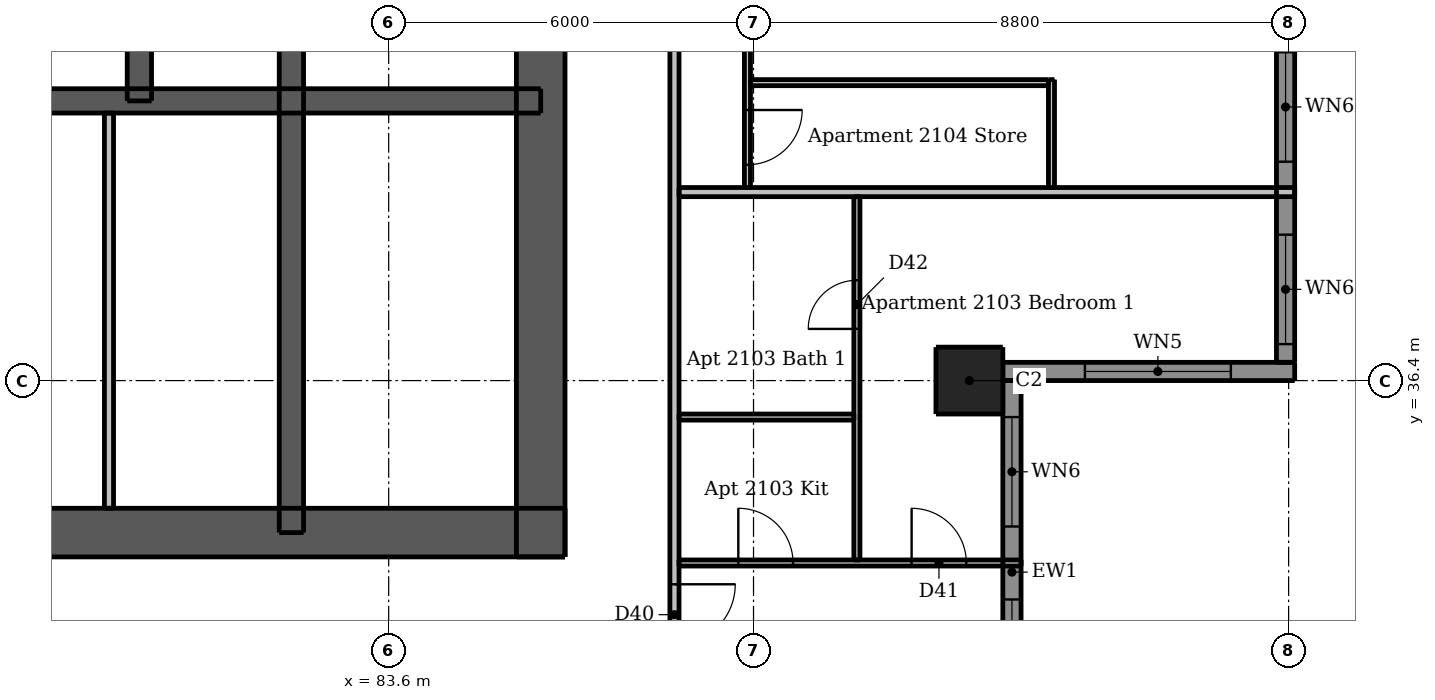
"""IFC4 building model, lengths in metres.
Left out: names, types, materials, properties, quantities, classifications, styles, units other than length and angle.
Written with IfcOpenShell. Run it as: python <this file> out.ifc"""

import sys

from ifc_helpers import new_model, si_unit, direction, frame, frame_2d, origin, origin_2d, place, context, subcontext, project, spatial, rectangle, extrude, element, fill, save


model = new_model("IFC4")
c1 = context("Model", 3, precision=1e-05, world=origin(), true_north=direction((0.0, 1.0)))
c2 = subcontext(c1, "Body", "Model", "MODEL_VIEW")
j1 = project(units=[si_unit("LENGTHUNIT", "METRE"), si_unit("PLANEANGLEUNIT", "RADIAN")], contexts=[c1])
p1 = place(None, origin())
s1 = spatial("IfcSite", under=j1, at=p1, CompositionType="ELEMENT")
p2 = place(p1, origin())
s2 = spatial("IfcBuilding", under=s1, at=p2, CompositionType="ELEMENT")
p3 = place(p2, frame((0.0, 0.0, 82.0)))
s3 = spatial("IfcBuildingStorey", under=s2, at=p3, CompositionType="ELEMENT", Elevation=82.0)
p4 = place(p3, frame((62.5, 33.9, 0.0), z_axis=(0.0, 0.0, 1.0), x_axis=(1.0, 0.0, 0.0)))
e1 = element("IfcWall", 1, at=p4, inside=s3, PredefinedType="SHEAR", context=c2, shape_type="SweptSolid", body=[
    extrude(rectangle(XDim=24.0, YDim=0.8, at=frame_2d((12.0, 0.0))), origin(), (0.0, 0.0, 1.0), 3.05),
])
p5 = place(p4, frame((2.0, 0.0, 0.0)))
e2 = element("IfcOpeningElement", 2, at=p5, cuts=e1, PredefinedType="OPENING", context=c2, shape_type="SweptSolid", body=[
    extrude(rectangle(XDim=1.1, YDim=2.1, at=frame_2d((0.55, 1.05))), frame((0.0, 0.41, 0.0), z_axis=(0.0, -1.0, 0.0), x_axis=(1.0, 0.0, 0.0)), (0.0, 0.0, 1.0), 0.82),
])
p6 = place(p4, frame((20.9, 0.0, 0.0)))
e3 = element("IfcOpeningElement", 3, at=p6, cuts=e1, PredefinedType="OPENING", context=c2, shape_type="SweptSolid", body=[
    extrude(rectangle(XDim=1.1, YDim=2.1, at=frame_2d((0.55, 1.05))), frame((0.0, 0.41, 0.0), z_axis=(0.0, -1.0, 0.0), x_axis=(1.0, 0.0, 0.0)), (0.0, 0.0, 1.0), 0.82),
])
p7 = place(p4, frame((8.0, 0.0, 0.0)))
e4 = element("IfcOpeningElement", 4, at=p7, cuts=e1, PredefinedType="OPENING", context=c2, shape_type="SweptSolid", body=[
    extrude(rectangle(XDim=1.1, YDim=2.1, at=frame_2d((0.55, 1.05))), frame((0.0, 0.41, 0.0), z_axis=(0.0, -1.0, 0.0), x_axis=(1.0, 0.0, 0.0)), (0.0, 0.0, 1.0), 0.82),
])
p8 = place(p4, frame((17.488, 0.0, 0.0)))
e5 = element("IfcOpeningElement", 5, at=p8, cuts=e1, PredefinedType="OPENING", context=c2, shape_type="SweptSolid", body=[
    extrude(rectangle(XDim=0.9, YDim=2.1, at=frame_2d((0.45, 1.05))), frame((0.0, 0.41, 0.0), z_axis=(0.0, -1.0, 0.0), x_axis=(1.0, 0.0, 0.0)), (0.0, 0.0, 1.0), 0.82),
])
p9 = place(p3, frame((86.1, 33.5, 0.0), z_axis=(0.0, 0.0, 1.0), x_axis=(0.0, 1.0, 0.0)))
e6 = element("IfcWall", 6, at=p9, inside=s3, PredefinedType="SHEAR", context=c2, shape_type="SweptSolid", body=[
    extrude(rectangle(XDim=24.0, YDim=0.8, at=frame_2d((12.0, 0.0))), origin(), (0.0, 0.0, 1.0), 3.05),
])
p10 = place(p9, frame((11.2, 0.0, 0.0)))
e7 = element("IfcOpeningElement", 7, at=p10, cuts=e6, PredefinedType="OPENING", context=c2, shape_type="SweptSolid", body=[
    extrude(rectangle(XDim=1.6, YDim=2.1, at=frame_2d((0.8, 1.05))), frame((0.0, 0.41, 0.0), z_axis=(0.0, -1.0, 0.0), x_axis=(1.0, 0.0, 0.0)), (0.0, 0.0, 1.0), 0.82),
])
p11 = place(p3, frame((62.9, 41.0, 0.0), z_axis=(0.0, 0.0, 1.0), x_axis=(1.0, 0.0, 0.0)))
e8 = element("IfcWall", 8, at=p11, inside=s3, PredefinedType="SHEAR", context=c2, shape_type="SweptSolid", body=[
    extrude(rectangle(XDim=23.2, YDim=0.4, at=frame_2d((11.6, 0.0))), origin(), (0.0, 0.0, 1.0), 3.05),
])
p12 = place(p3, frame((82.0, 33.9, 0.0), z_axis=(0.0, 0.0, 1.0), x_axis=(0.0, 1.0, 0.0)))
e9 = element("IfcWall", 9, at=p12, inside=s3, PredefinedType="SHEAR", context=c2, shape_type="SweptSolid", body=[
    extrude(rectangle(XDim=10.0, YDim=0.4, at=frame_2d((5.0, 0.0))), origin(), (0.0, 0.0, 1.0), 3.05),
])
p13 = place(p3, frame((79.5, 41.0, 0.0), z_axis=(0.0, 0.0, 1.0), x_axis=(0.0, 1.0, 0.0)))
e10 = element("IfcWall", 10, at=p13, inside=s3, PredefinedType="SHEAR", context=c2, shape_type="SweptSolid", body=[
    extrude(rectangle(XDim=2.9, YDim=0.4, at=frame_2d((1.45, 0.0))), origin(), (0.0, 0.0, 1.0), 3.05),
])
p14 = place(p3, frame((93.15, 36.4, 0.0), z_axis=(0.0, 0.0, 1.0), x_axis=(1.0, 0.0, 0.0)))
e11 = element("IfcColumn", 11, at=p14, inside=s3, PredefinedType="COLUMN", context=c2, shape_type="SweptSolid", body=[
    extrude(rectangle(XDim=1.1, YDim=1.1, at=origin_2d()), origin(), (0.0, 0.0, 1.0), 3.05),
])
p15 = place(p3, frame((93.7, 36.55, 0.0), z_axis=(0.0, 0.0, 1.0), x_axis=(1.0, 0.0, 0.0)))
e12 = element("IfcWall", 12, at=p15, inside=s3, PredefinedType="SOLIDWALL", context=c2, shape_type="SweptSolid", body=[
    extrude(rectangle(XDim=4.8, YDim=0.3, at=frame_2d((2.4, 0.0))), origin(), (0.0, 0.0, 1.0), 3.05),
])
p16 = place(p15, frame((1.35, 0.0, 0.15)))
e13 = element("IfcOpeningElement", 13, at=p16, cuts=e12, PredefinedType="OPENING", context=c2, shape_type="SweptSolid", body=[
    extrude(rectangle(XDim=2.4, YDim=2.1, at=frame_2d((1.2, 1.05))), frame((0.0, 0.16, 0.0), z_axis=(0.0, -1.0, 0.0), x_axis=(1.0, 0.0, 0.0)), (0.0, 0.0, 1.0), 0.32),
])
p17 = place(p3, frame((93.85, 30.1, 0.0), z_axis=(0.0, 0.0, 1.0), x_axis=(0.0, 1.0, 0.0)))
e14 = element("IfcWall", 14, at=p17, inside=s3, PredefinedType="SOLIDWALL", context=c2, shape_type="SweptSolid", body=[
    extrude(rectangle(XDim=6.3, YDim=0.3, at=frame_2d((3.15, 0.0))), origin(), (0.0, 0.0, 1.0), 3.05),
])
p18 = place(p17, frame((0.9, 0.0, 0.15)))
e15 = element("IfcOpeningElement", 15, at=p18, cuts=e14, PredefinedType="OPENING", context=c2, shape_type="SweptSolid", body=[
    extrude(rectangle(XDim=1.8, YDim=2.1, at=frame_2d((0.9, 1.05))), frame((0.0, 0.16, 0.0), z_axis=(0.0, -1.0, 0.0), x_axis=(1.0, 0.0, 0.0)), (0.0, 0.0, 1.0), 0.32),
])
p19 = place(p17, frame((3.9, 0.0, 0.15)))
e16 = element("IfcOpeningElement", 16, at=p19, cuts=e14, PredefinedType="OPENING", context=c2, shape_type="SweptSolid", body=[
    extrude(rectangle(XDim=1.8, YDim=2.1, at=frame_2d((0.9, 1.05))), frame((0.0, 0.16, 0.0), z_axis=(0.0, -1.0, 0.0), x_axis=(1.0, 0.0, 0.0)), (0.0, 0.0, 1.0), 0.32),
])
p20 = place(p3, frame((98.35, 36.7, 0.0), z_axis=(0.0, 0.0, 1.0), x_axis=(0.0, 1.0, 0.0)))
e17 = element("IfcWall", 17, at=p20, inside=s3, PredefinedType="SOLIDWALL", context=c2, shape_type="SweptSolid", body=[
    extrude(rectangle(XDim=5.7, YDim=0.3, at=frame_2d((2.85, 0.0))), origin(), (0.0, 0.0, 1.0), 3.05),
])
p21 = place(p20, frame((0.3, 0.0, 0.15)))
e18 = element("IfcOpeningElement", 18, at=p21, cuts=e17, PredefinedType="OPENING", context=c2, shape_type="SweptSolid", body=[
    extrude(rectangle(XDim=1.8, YDim=2.1, at=frame_2d((0.9, 1.05))), frame((0.0, 0.16, 0.0), z_axis=(0.0, -1.0, 0.0), x_axis=(1.0, 0.0, 0.0)), (0.0, 0.0, 1.0), 0.32),
])
p22 = place(p20, frame((3.3, 0.0, 0.15)))
e19 = element("IfcOpeningElement", 19, at=p22, cuts=e17, PredefinedType="OPENING", context=c2, shape_type="SweptSolid", body=[
    extrude(rectangle(XDim=1.8, YDim=2.1, at=frame_2d((0.9, 1.05))), frame((0.0, 0.16, 0.0), z_axis=(0.0, -1.0, 0.0), x_axis=(1.0, 0.0, 0.0)), (0.0, 0.0, 1.0), 0.32),
])
p23 = place(p3, frame((79.0, 34.3, 0.0), z_axis=(0.0, 0.0, 1.0), x_axis=(0.0, 1.0, 0.0)))
e20 = element("IfcWall", 20, at=p23, inside=s3, PredefinedType="PLUMBINGWALL", context=c2, shape_type="SweptSolid", body=[
    extrude(rectangle(XDim=6.5, YDim=0.15, at=frame_2d((3.25, 0.0))), origin(), (0.0, 0.0, 1.0), 3.05),
])
p24 = place(p3, frame((89.5, 59.35, 0.0), z_axis=(0.0, 0.0, 1.0), x_axis=(0.0, -1.0, 0.0)))
e21 = element("IfcWall", 21, at=p24, inside=s3, PredefinedType="PARTITIONING", context=c2, shape_type="SweptSolid", body=[
    extrude(rectangle(XDim=19.775, YDim=0.1, at=frame_2d((9.888, 0.0))), origin(), (0.0, 0.0, 1.0), 2.51),
])
p25 = place(p24, frame((14.95, 0.0, 0.0)))
e22 = element("IfcOpeningElement", 22, at=p25, cuts=e21, PredefinedType="OPENING", context=c2, shape_type="SweptSolid", body=[
    extrude(rectangle(XDim=0.9, YDim=2.1, at=frame_2d((0.45, 1.05))), frame((0.0, 0.06, 0.0), z_axis=(0.0, -1.0, 0.0), x_axis=(1.0, 0.0, 0.0)), (0.0, 0.0, 1.0), 0.12),
])
p26 = place(p24, frame((9.0, 0.0, 0.0)))
e23 = element("IfcOpeningElement", 23, at=p26, cuts=e21, PredefinedType="OPENING", context=c2, shape_type="SweptSolid", body=[
    extrude(rectangle(XDim=0.9, YDim=2.1, at=frame_2d((0.45, 1.05))), frame((0.0, 0.06, 0.0), z_axis=(0.0, -1.0, 0.0), x_axis=(1.0, 0.0, 0.0)), (0.0, 0.0, 1.0), 0.12),
])
p27 = place(p24, frame((11.4, 0.0, 0.0)))
e24 = element("IfcOpeningElement", 24, at=p27, cuts=e21, PredefinedType="OPENING", context=c2, shape_type="SweptSolid", body=[
    extrude(rectangle(XDim=0.9, YDim=2.1, at=frame_2d((0.45, 1.05))), frame((0.0, 0.06, 0.0), z_axis=(0.0, -1.0, 0.0), x_axis=(1.0, 0.0, 0.0)), (0.0, 0.0, 1.0), 0.12),
])
p28 = place(p24, frame((18.5, 0.0, 0.0)))
e25 = element("IfcOpeningElement", 25, at=p28, cuts=e21, PredefinedType="OPENING", context=c2, shape_type="SweptSolid", body=[
    extrude(rectangle(XDim=0.9, YDim=2.1, at=frame_2d((0.45, 1.05))), frame((0.0, 0.06, 0.0), z_axis=(0.0, -1.0, 0.0), x_axis=(1.0, 0.0, 0.0)), (0.0, 0.0, 1.0), 0.12),
])
p29 = place(p24, frame((6.0, 0.0, 0.0)))
e26 = element("IfcOpeningElement", 26, at=p29, cuts=e21, PredefinedType="OPENING", context=c2, shape_type="SweptSolid", body=[
    extrude(rectangle(XDim=0.9, YDim=2.1, at=frame_2d((0.45, 1.05))), frame((0.0, 0.06, 0.0), z_axis=(0.0, -1.0, 0.0), x_axis=(1.0, 0.0, 0.0)), (0.0, 0.0, 1.0), 0.12),
])
p30 = place(p24, frame((0.85, 0.0, 0.0)))
e27 = element("IfcOpeningElement", 27, at=p30, cuts=e21, PredefinedType="OPENING", context=c2, shape_type="SweptSolid", body=[
    extrude(rectangle(XDim=0.9, YDim=2.1, at=frame_2d((0.45, 1.05))), frame((0.0, 0.06, 0.0), z_axis=(0.0, -1.0, 0.0), x_axis=(1.0, 0.0, 0.0)), (0.0, 0.0, 1.0), 0.12),
])
p31 = place(p24, frame((3.35, 0.0, 0.0)))
e28 = element("IfcOpeningElement", 28, at=p31, cuts=e21, PredefinedType="OPENING", context=c2, shape_type="SweptSolid", body=[
    extrude(rectangle(XDim=0.8, YDim=2.1, at=frame_2d((0.4, 1.05))), frame((0.0, 0.06, 0.0), z_axis=(0.0, -1.0, 0.0), x_axis=(1.0, 0.0, 0.0)), (0.0, 0.0, 1.0), 0.12),
])
p32 = place(p3, frame((91.3, 33.45, 0.0), z_axis=(0.0, 0.0, 1.0), x_axis=(0.0, 1.0, 0.0)))
e29 = element("IfcWall", 29, at=p32, inside=s3, PredefinedType="PARTITIONING", context=c2, shape_type="SweptSolid", body=[
    extrude(rectangle(XDim=5.975, YDim=0.1, at=frame_2d((2.988, 0.0))), origin(), (0.0, 0.0, 1.0), 3.05),
])
p33 = place(p32, frame((3.8, 0.0, 0.0)))
e30 = element("IfcOpeningElement", 30, at=p33, cuts=e29, PredefinedType="OPENING", context=c2, shape_type="SweptSolid", body=[
    extrude(rectangle(XDim=0.8, YDim=2.1, at=frame_2d((0.4, 1.05))), frame((0.0, 0.06, 0.0), z_axis=(0.0, -1.0, 0.0), x_axis=(1.0, 0.0, 0.0)), (0.0, 0.0, 1.0), 0.12),
])
p34 = place(p3, frame((94.5, 39.575, 0.0), z_axis=(0.0, 0.0, 1.0), x_axis=(0.0, 1.0, 0.0)))
e31 = element("IfcWall", 31, at=p34, inside=s3, PredefinedType="PARTITIONING", context=c2, shape_type="SweptSolid", body=[
    extrude(rectangle(XDim=1.775, YDim=0.1, at=frame_2d((0.888, 0.0))), origin(), (0.0, 0.0, 1.0), 3.05),
])
p35 = place(p3, frame((89.55, 41.3, 0.0), z_axis=(0.0, 0.0, 1.0), x_axis=(1.0, 0.0, 0.0)))
e32 = element("IfcWall", 32, at=p35, inside=s3, PredefinedType="PARTITIONING", context=c2, shape_type="SweptSolid", body=[
    extrude(rectangle(XDim=4.9, YDim=0.1, at=frame_2d((2.45, 0.0))), origin(), (0.0, 0.0, 1.0), 3.05),
])
p36 = place(p3, frame((88.375, 35.8, 0.0), z_axis=(0.0, 0.0, 1.0), x_axis=(1.0, 0.0, 0.0)))
e33 = element("IfcWall", 33, at=p36, inside=s3, PredefinedType="PARTITIONING", context=c2, shape_type="SweptSolid", body=[
    extrude(rectangle(XDim=2.875, YDim=0.1, at=frame_2d((1.438, 0.0))), origin(), (0.0, 0.0, 1.0), 3.05),
])
p37 = place(p3, frame((88.375, 33.4, 0.0), z_axis=(0.0, 0.0, 1.0), x_axis=(1.0, 0.0, 0.0)))
e34 = element("IfcWall", 34, at=p37, inside=s3, PredefinedType="PARTITIONING", context=c2, shape_type="SweptSolid", body=[
    extrude(rectangle(XDim=5.625, YDim=0.1, at=frame_2d((2.812, 0.0))), origin(), (0.0, 0.0, 1.0), 3.05),
])
p38 = place(p37, frame((0.975, 0.0, 0.0)))
e35 = element("IfcOpeningElement", 35, at=p38, cuts=e34, PredefinedType="OPENING", context=c2, shape_type="SweptSolid", body=[
    extrude(rectangle(XDim=0.9, YDim=2.1, at=frame_2d((0.45, 1.05))), frame((0.0, 0.06, 0.0), z_axis=(0.0, -1.0, 0.0), x_axis=(1.0, 0.0, 0.0)), (0.0, 0.0, 1.0), 0.12),
])
p39 = place(p37, frame((3.825, 0.0, 0.0)))
e36 = element("IfcOpeningElement", 36, at=p39, cuts=e34, PredefinedType="OPENING", context=c2, shape_type="SweptSolid", body=[
    extrude(rectangle(XDim=0.9, YDim=2.1, at=frame_2d((0.45, 1.05))), frame((0.0, 0.06, 0.0), z_axis=(0.0, -1.0, 0.0), x_axis=(1.0, 0.0, 0.0)), (0.0, 0.0, 1.0), 0.12),
])
p40 = place(p3, frame((88.3, 60.475, 0.0), z_axis=(0.0, 0.0, 1.0), x_axis=(0.0, -1.0, 0.0)))
e37 = element("IfcWall", 37, at=p40, inside=s3, PredefinedType="PARTITIONING", context=c2, shape_type="SweptSolid", body=[
    extrude(rectangle(XDim=28.7, YDim=0.15, at=frame_2d((14.35, 0.0))), origin(), (0.0, 0.0, 1.0), 3.05),
])
p41 = place(p40, frame((27.425, 0.0, 0.0)))
e38 = element("IfcOpeningElement", 38, at=p41, cuts=e37, PredefinedType="OPENING", context=c2, shape_type="SweptSolid", body=[
    extrude(rectangle(XDim=1.0, YDim=2.1, at=frame_2d((0.5, 1.05))), frame((0.0, 0.085, 0.0), z_axis=(0.0, -1.0, 0.0), x_axis=(1.0, 0.0, 0.0)), (0.0, 0.0, 1.0), 0.17),
])
p42 = place(p40, frame((10.575, 0.0, 0.0)))
e39 = element("IfcOpeningElement", 39, at=p42, cuts=e37, PredefinedType="OPENING", context=c2, shape_type="SweptSolid", body=[
    extrude(rectangle(XDim=1.0, YDim=2.1, at=frame_2d((0.5, 1.05))), frame((0.0, 0.085, 0.0), z_axis=(0.0, -1.0, 0.0), x_axis=(1.0, 0.0, 0.0)), (0.0, 0.0, 1.0), 0.17),
])
p43 = place(p3, frame((88.375, 39.5, 0.0), z_axis=(0.0, 0.0, 1.0), x_axis=(1.0, 0.0, 0.0)))
e40 = element("IfcWall", 40, at=p43, inside=s3, PredefinedType="PARTITIONING", context=c2, shape_type="SweptSolid", body=[
    extrude(rectangle(XDim=10.125, YDim=0.15, at=frame_2d((5.062, 0.0))), origin(), (0.0, 0.0, 1.0), 3.05),
])
p44 = place(p16, origin())
e41 = element("IfcWindow", 41, at=p44, inside=s3, PartitioningType="DOUBLE_PANEL_VERTICAL", PredefinedType="WINDOW", context=c2, shape_type="SweptSolid", body=[
    extrude(rectangle(XDim=2.4, YDim=2.1, at=frame_2d((1.2, 1.05))), frame((0.0, 0.03, 0.0), z_axis=(0.0, -1.0, 0.0), x_axis=(1.0, 0.0, 0.0)), (0.0, 0.0, 1.0), 0.06),
])
fill(e13, e41)
p45 = place(p18, origin())
e42 = element("IfcWindow", 42, at=p45, inside=s3, PartitioningType="DOUBLE_PANEL_VERTICAL", PredefinedType="WINDOW", context=c2, shape_type="SweptSolid", body=[
    extrude(rectangle(XDim=1.8, YDim=2.1, at=frame_2d((0.9, 1.05))), frame((0.0, 0.03, 0.0), z_axis=(0.0, -1.0, 0.0), x_axis=(1.0, 0.0, 0.0)), (0.0, 0.0, 1.0), 0.06),
])
fill(e15, e42)
p46 = place(p19, origin())
e43 = element("IfcWindow", 43, at=p46, inside=s3, PartitioningType="DOUBLE_PANEL_VERTICAL", PredefinedType="WINDOW", context=c2, shape_type="SweptSolid", body=[
    extrude(rectangle(XDim=1.8, YDim=2.1, at=frame_2d((0.9, 1.05))), frame((0.0, 0.03, 0.0), z_axis=(0.0, -1.0, 0.0), x_axis=(1.0, 0.0, 0.0)), (0.0, 0.0, 1.0), 0.06),
])
fill(e16, e43)
p47 = place(p21, origin())
e44 = element("IfcWindow", 44, at=p47, inside=s3, PartitioningType="DOUBLE_PANEL_VERTICAL", PredefinedType="WINDOW", context=c2, shape_type="SweptSolid", body=[
    extrude(rectangle(XDim=1.8, YDim=2.1, at=frame_2d((0.9, 1.05))), frame((0.0, 0.03, 0.0), z_axis=(0.0, -1.0, 0.0), x_axis=(1.0, 0.0, 0.0)), (0.0, 0.0, 1.0), 0.06),
])
fill(e18, e44)
p48 = place(p22, origin())
e45 = element("IfcWindow", 45, at=p48, inside=s3, PartitioningType="DOUBLE_PANEL_VERTICAL", PredefinedType="WINDOW", context=c2, shape_type="SweptSolid", body=[
    extrude(rectangle(XDim=1.8, YDim=2.1, at=frame_2d((0.9, 1.05))), frame((0.0, 0.03, 0.0), z_axis=(0.0, -1.0, 0.0), x_axis=(1.0, 0.0, 0.0)), (0.0, 0.0, 1.0), 0.06),
])
fill(e19, e45)
p49 = place(p6, origin())
e46 = element("IfcDoor", 46, at=p49, inside=s3, OperationType="SINGLE_SWING_RIGHT", PredefinedType="DOOR", context=c2, shape_type="SweptSolid", body=[
    extrude(rectangle(XDim=1.1, YDim=2.1, at=frame_2d((0.55, 1.05))), frame((0.0, 0.388, 0.0), z_axis=(0.0, -1.0, 0.0), x_axis=(1.0, 0.0, 0.0)), (0.0, 0.0, 1.0), 0.05),
])
fill(e3, e46)
p50 = place(p8, origin())
e47 = element("IfcDoor", 47, at=p50, inside=s3, OperationType="SINGLE_SWING_LEFT", PredefinedType="DOOR", context=c2, shape_type="SweptSolid", body=[
    extrude(rectangle(XDim=0.9, YDim=2.1, at=frame_2d((0.45, 1.05))), frame((0.0, 0.388, 0.0), z_axis=(0.0, -1.0, 0.0), x_axis=(1.0, 0.0, 0.0)), (0.0, 0.0, 1.0), 0.05),
])
fill(e5, e47)
p51 = place(p41, origin())
e48 = element("IfcDoor", 48, at=p51, inside=s3, OperationType="SINGLE_SWING_LEFT", PredefinedType="DOOR", context=c2, shape_type="SweptSolid", body=[
    extrude(rectangle(XDim=1.0, YDim=2.1, at=frame_2d((0.5, 1.05))), frame((0.0, 0.025, 0.0), z_axis=(0.0, -1.0, 0.0), x_axis=(1.0, 0.0, 0.0)), (0.0, 0.0, 1.0), 0.05),
])
fill(e38, e48)
p52 = place(p38, origin())
e49 = element("IfcDoor", 49, at=p52, inside=s3, OperationType="SINGLE_SWING_LEFT", PredefinedType="DOOR", context=c2, shape_type="SweptSolid", body=[
    extrude(rectangle(XDim=0.9, YDim=2.1, at=frame_2d((0.45, 1.05))), frame((0.0, 0.025, 0.0), z_axis=(0.0, -1.0, 0.0), x_axis=(1.0, 0.0, 0.0)), (0.0, 0.0, 1.0), 0.05),
])
fill(e35, e49)
p53 = place(p39, origin())
e50 = element("IfcDoor", 50, at=p53, inside=s3, OperationType="SINGLE_SWING_LEFT", PredefinedType="DOOR", context=c2, shape_type="SweptSolid", body=[
    extrude(rectangle(XDim=0.9, YDim=2.1, at=frame_2d((0.45, 1.05))), frame((0.0, 0.025, 0.0), z_axis=(0.0, -1.0, 0.0), x_axis=(1.0, 0.0, 0.0)), (0.0, 0.0, 1.0), 0.05),
])
fill(e36, e50)
p54 = place(p33, origin())
e51 = element("IfcDoor", 51, at=p54, inside=s3, OperationType="SINGLE_SWING_LEFT", PredefinedType="DOOR", context=c2, shape_type="SweptSolid", body=[
    extrude(rectangle(XDim=0.8, YDim=2.1, at=frame_2d((0.4, 1.05))), frame((0.0, 0.025, 0.0), z_axis=(0.0, -1.0, 0.0), x_axis=(1.0, 0.0, 0.0)), (0.0, 0.0, 1.0), 0.05),
])
fill(e30, e51)
p55 = place(p28, origin())
e52 = element("IfcDoor", 52, at=p55, inside=s3, OperationType="SINGLE_SWING_LEFT", PredefinedType="DOOR", context=c2, shape_type="SweptSolid", body=[
    extrude(rectangle(XDim=0.9, YDim=2.1, at=frame_2d((0.45, 1.05))), frame((0.0, 0.025, 0.0), z_axis=(0.0, -1.0, 0.0), x_axis=(1.0, 0.0, 0.0)), (0.0, 0.0, 1.0), 0.05),
])
fill(e25, e52)
save(model, sys.argv[1])
